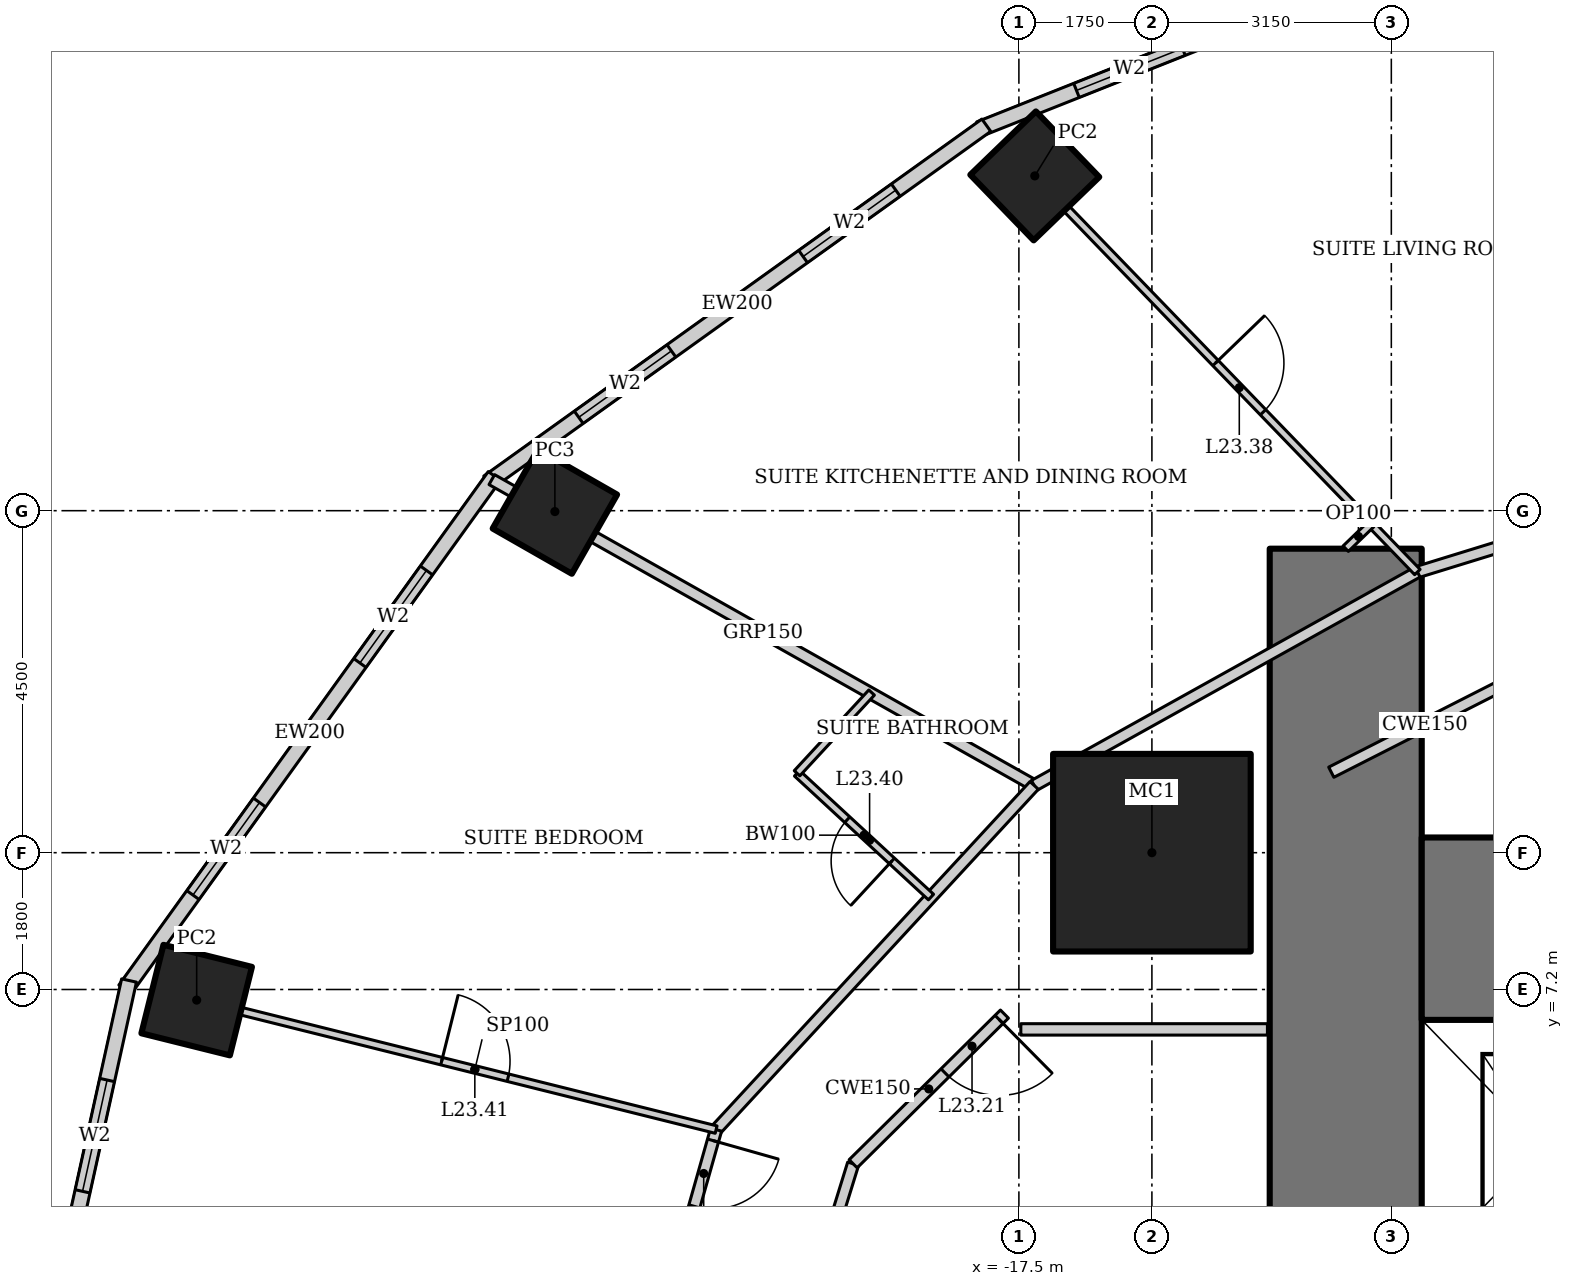
"""IFC4 building model, lengths in metres.
Left out: names, types, materials, properties, quantities, classifications, styles, units other than length and angle.
Written with IfcOpenShell. Run it as: python <this file> out.ifc"""

import sys

from ifc_helpers import new_model, si_unit, direction, frame, frame_2d, origin, origin_2d, place, context, subcontext, project, spatial, rectangle, hollow_rectangle, extrude, element, fill, save


model = new_model("IFC4")
c1 = context("Model", 3, precision=1e-05, world=origin(), true_north=direction((0.0, 1.0)))
c2 = subcontext(c1, "Body", "Model", "MODEL_VIEW")
j1 = project(units=[si_unit("LENGTHUNIT", "METRE"), si_unit("PLANEANGLEUNIT", "RADIAN")], contexts=[c1])
p1 = place(None, origin())
s1 = spatial("IfcSite", under=j1, at=p1, CompositionType="ELEMENT")
p2 = place(p1, origin())
s2 = spatial("IfcBuilding", under=s1, at=p2, CompositionType="ELEMENT")
p3 = place(p2, frame((0.0, 0.0, 98.2)))
s3 = spatial("IfcBuildingStorey", under=s2, at=p3, CompositionType="ELEMENT", Elevation=98.2)
p4 = place(p3, frame((-15.75, 9.0, 0.0), z_axis=(0.0, 0.0, 1.0), x_axis=(1.0, 0.0, 0.0)))
e1 = element("IfcColumn", 1, at=p4, inside=s3, PredefinedType="COLUMN", context=c2, shape_type="SweptSolid", body=[
    extrude(hollow_rectangle(XDim=2.6, YDim=2.6, WallThickness=0.13, at=origin_2d()), origin(), (0.0, 0.0, 1.0), 3.6),
])
p5 = place(p3, frame((-17.291, 17.905, 0.0), z_axis=(0.0, 0.0, 1.0), x_axis=(0.719339800339, 0.694658370459, 0.0)))
e2 = element("IfcColumn", 2, at=p5, inside=s3, PredefinedType="COLUMN", context=c2, shape_type="SweptSolid", body=[
    extrude(hollow_rectangle(XDim=1.2, YDim=1.2, WallThickness=0.1, at=origin_2d()), origin(), (0.0, 0.0, 1.0), 3.6),
])
p6 = place(p3, frame((-23.605, 13.489, 0.0), z_axis=(0.0, 0.0, 1.0), x_axis=(0.496139221777, 0.86824298017, 0.0)))
e3 = element("IfcColumn", 3, at=p6, inside=s3, PredefinedType="COLUMN", context=c2, shape_type="SweptSolid", body=[
    extrude(hollow_rectangle(XDim=1.2, YDim=1.2, WallThickness=0.12, at=origin_2d()), origin(), (0.0, 0.0, 1.0), 3.6),
])
p7 = place(p3, frame((-28.318, 7.06, 0.0), z_axis=(0.0, 0.0, 1.0), x_axis=(0.2419218956, 0.970295726276, 0.0)))
e4 = element("IfcColumn", 4, at=p7, inside=s3, PredefinedType="COLUMN", context=c2, shape_type="SweptSolid", body=[
    extrude(hollow_rectangle(XDim=1.2, YDim=1.2, WallThickness=0.1, at=origin_2d()), origin(), (0.0, 0.0, 1.0), 3.6),
])
p8 = place(p3, frame((-13.2, 13.0, 0.0), z_axis=(0.0, 0.0, 1.0), x_axis=(0.0, -1.0, 0.0)))
e5 = element("IfcWall", 5, at=p8, inside=s3, PredefinedType="SHEAR", context=c2, shape_type="SweptSolid", body=[
    extrude(rectangle(XDim=26.0, YDim=2.0, at=frame_2d((13.0, 0.0))), origin(), (0.0, 0.0, 1.0), 3.6),
])
p9 = place(p8, frame((12.1, 0.0, 0.0)))
e6 = element("IfcOpeningElement", 6, at=p9, cuts=e5, PredefinedType="OPENING", context=c2, shape_type="SweptSolid", body=[
    extrude(rectangle(XDim=1.8, YDim=2.1, at=frame_2d((0.9, 1.05))), frame((0.0, 1.01, 0.0), z_axis=(0.0, -1.0, 0.0), x_axis=(1.0, 0.0, 0.0)), (0.0, 0.0, 1.0), 2.02),
])
p10 = place(p3, frame((12.2, 8.0, 0.0), z_axis=(0.0, 0.0, 1.0), x_axis=(-1.0, 0.0, 0.0)))
e7 = element("IfcWall", 7, at=p10, inside=s3, PredefinedType="SHEAR", context=c2, shape_type="SweptSolid", body=[
    extrude(rectangle(XDim=24.4, YDim=2.4, at=frame_2d((12.2, 0.0))), origin(), (0.0, 0.0, 1.0), 3.6),
])
p11 = place(p3, frame((-10.869, 21.363, 0.0), z_axis=(0.0, 0.0, 1.0), x_axis=(-0.929358351251, -0.369178892895, 0.0)))
e8 = element("IfcWall", 8, at=p11, inside=s3, PredefinedType="SOLIDWALL", context=c2, shape_type="SweptSolid", body=[
    extrude(rectangle(XDim=7.692, YDim=0.2, at=frame_2d((3.846, 0.0))), origin(), (0.0, 0.0, 1.0), 3.45),
])
p12 = place(p11, frame((1.373, 0.0, 0.5)))
e9 = element("IfcOpeningElement", 9, at=p12, cuts=e8, PredefinedType="OPENING", context=c2, shape_type="SweptSolid", body=[
    extrude(rectangle(XDim=1.5, YDim=2.2, at=frame_2d((0.75, 1.1))), frame((0.0, 0.11, 0.0), z_axis=(0.0, -1.0, 0.0), x_axis=(1.0, 0.0, 0.0)), (0.0, 0.0, 1.0), 0.22),
])
p13 = place(p11, frame((4.819, 0.0, 0.5)))
e10 = element("IfcOpeningElement", 10, at=p13, cuts=e8, PredefinedType="OPENING", context=c2, shape_type="SweptSolid", body=[
    extrude(rectangle(XDim=1.5, YDim=2.2, at=frame_2d((0.75, 1.1))), frame((0.0, 0.11, 0.0), z_axis=(0.0, -1.0, 0.0), x_axis=(1.0, 0.0, 0.0)), (0.0, 0.0, 1.0), 0.22),
])
p14 = place(p3, frame((-17.929, 18.572, 0.0), z_axis=(0.0, 0.0, 1.0), x_axis=(-0.812791321576, -0.582554948112, 0.0)))
e11 = element("IfcWall", 11, at=p14, inside=s3, PredefinedType="SOLIDWALL", context=c2, shape_type="SweptSolid", body=[
    extrude(rectangle(XDim=8.063, YDim=0.2, at=frame_2d((4.032, 0.0))), origin(), (0.0, 0.0, 1.0), 3.45),
])
p15 = place(p14, frame((1.466, 0.0, 0.5)))
e12 = element("IfcOpeningElement", 12, at=p15, cuts=e11, PredefinedType="OPENING", context=c2, shape_type="SweptSolid", body=[
    extrude(rectangle(XDim=1.5, YDim=2.2, at=frame_2d((0.75, 1.1))), frame((0.0, 0.11, 0.0), z_axis=(0.0, -1.0, 0.0), x_axis=(1.0, 0.0, 0.0)), (0.0, 0.0, 1.0), 0.22),
])
p16 = place(p14, frame((5.097, 0.0, 0.5)))
e13 = element("IfcOpeningElement", 13, at=p16, cuts=e11, PredefinedType="OPENING", context=c2, shape_type="SweptSolid", body=[
    extrude(rectangle(XDim=1.5, YDim=2.2, at=frame_2d((0.75, 1.1))), frame((0.0, 0.11, 0.0), z_axis=(0.0, -1.0, 0.0), x_axis=(1.0, 0.0, 0.0)), (0.0, 0.0, 1.0), 0.22),
])
p17 = place(p3, frame((-24.4, 13.957, 0.0), z_axis=(0.0, 0.0, 1.0), x_axis=(-0.583937613703, -0.811798536155, 0.0)))
e14 = element("IfcWall", 14, at=p17, inside=s3, PredefinedType="SOLIDWALL", context=c2, shape_type="SweptSolid", body=[
    extrude(rectangle(XDim=8.323, YDim=0.2, at=frame_2d((4.162, 0.0))), origin(), (0.0, 0.0, 1.0), 3.45),
])
p18 = place(p17, frame((1.531, 0.0, 0.5)))
e15 = element("IfcOpeningElement", 15, at=p18, cuts=e14, PredefinedType="OPENING", context=c2, shape_type="SweptSolid", body=[
    extrude(rectangle(XDim=1.5, YDim=2.2, at=frame_2d((0.75, 1.1))), frame((0.0, 0.11, 0.0), z_axis=(0.0, -1.0, 0.0), x_axis=(1.0, 0.0, 0.0)), (0.0, 0.0, 1.0), 0.22),
])
p19 = place(p17, frame((5.292, 0.0, 0.5)))
e16 = element("IfcOpeningElement", 16, at=p19, cuts=e14, PredefinedType="OPENING", context=c2, shape_type="SweptSolid", body=[
    extrude(rectangle(XDim=1.5, YDim=2.2, at=frame_2d((0.75, 1.1))), frame((0.0, 0.11, 0.0), z_axis=(0.0, -1.0, 0.0), x_axis=(1.0, 0.0, 0.0)), (0.0, 0.0, 1.0), 0.22),
])
p20 = place(p3, frame((-29.208, 7.318, 0.0), z_axis=(0.0, 0.0, 1.0), x_axis=(-0.215238065514, -0.976561608478, 0.0)))
e17 = element("IfcWall", 17, at=p20, inside=s3, PredefinedType="SOLIDWALL", context=c2, shape_type="SweptSolid", body=[
    extrude(rectangle(XDim=7.562, YDim=0.2, at=frame_2d((3.781, 0.0))), origin(), (0.0, 0.0, 1.0), 3.45),
])
p21 = place(p20, frame((1.341, 0.0, 0.5)))
e18 = element("IfcOpeningElement", 18, at=p21, cuts=e17, PredefinedType="OPENING", context=c2, shape_type="SweptSolid", body=[
    extrude(rectangle(XDim=1.5, YDim=2.2, at=frame_2d((0.75, 1.1))), frame((0.0, 0.11, 0.0), z_axis=(0.0, -1.0, 0.0), x_axis=(1.0, 0.0, 0.0)), (0.0, 0.0, 1.0), 0.22),
])
p22 = place(p20, frame((4.722, 0.0, 0.5)))
e19 = element("IfcOpeningElement", 19, at=p22, cuts=e17, PredefinedType="OPENING", context=c2, shape_type="SweptSolid", body=[
    extrude(rectangle(XDim=1.5, YDim=2.2, at=frame_2d((0.75, 1.1))), frame((0.0, 0.11, 0.0), z_axis=(0.0, -1.0, 0.0), x_axis=(1.0, 0.0, 0.0)), (0.0, 0.0, 1.0), 0.22),
])
p23 = place(p3, frame((-24.435, 13.909, 0.0), z_axis=(0.0, 0.0, 1.0), x_axis=(0.871075246657, -0.491149584813, 0.0)))
e20 = element("IfcWall", 20, at=p23, inside=s3, PredefinedType="PARTITIONING", context=c2, shape_type="SweptSolid", body=[
    extrude(rectangle(XDim=8.192, YDim=0.15, at=frame_2d((4.096, 0.0))), origin(), (0.0, 0.0, 1.0), 2.693),
])
p24 = place(p3, frame((-7.253, 14.235, 0.0), z_axis=(0.0, 0.0, 1.0), x_axis=(-0.955657956744, -0.294478980085, 0.0)))
e21 = element("IfcWall", 21, at=p24, inside=s3, PredefinedType="PARTITIONING", context=c2, shape_type="SweptSolid", body=[
    extrude(rectangle(XDim=5.236, YDim=0.15, at=frame_2d((2.618, 0.0))), origin(), (0.0, 0.0, 1.0), 3.45),
])
p25 = place(p24, frame((0.15, 0.0, 0.0)))
e22 = element("IfcOpeningElement", 22, at=p25, cuts=e21, PredefinedType="OPENING", context=c2, shape_type="SweptSolid", body=[
    extrude(rectangle(XDim=0.9, YDim=2.1, at=frame_2d((0.45, 1.05))), frame((0.0, 0.085, 0.0), z_axis=(0.0, -1.0, 0.0), x_axis=(1.0, 0.0, 0.0)), (0.0, 0.0, 1.0), 0.17),
])
p26 = place(p3, frame((-12.257, 12.693, 0.0), z_axis=(0.0, 0.0, 1.0), x_axis=(-0.873695910579, -0.486472461541, 0.0)))
e23 = element("IfcWall", 23, at=p26, inside=s3, PredefinedType="PARTITIONING", context=c2, shape_type="SweptSolid", body=[
    extrude(rectangle(XDim=5.771, YDim=0.15, at=frame_2d((2.885, 0.0))), origin(), (0.0, 0.0, 1.0), 3.45),
])
p27 = place(p3, frame((-17.299, 9.885, 0.0), z_axis=(0.0, 0.0, 1.0), x_axis=(-0.678641806296, -0.734469399463, 0.0)))
e24 = element("IfcWall", 24, at=p27, inside=s3, PredefinedType="PARTITIONING", context=c2, shape_type="SweptSolid", body=[
    extrude(rectangle(XDim=6.166, YDim=0.15, at=frame_2d((3.083, 0.0))), origin(), (0.0, 0.0, 1.0), 3.45),
])
p28 = place(p3, frame((-21.484, 5.356, 0.0), z_axis=(0.0, 0.0, 1.0), x_axis=(-0.272386051236, -0.962188047677, 0.0)))
e25 = element("IfcWall", 25, at=p28, inside=s3, PredefinedType="PARTITIONING", context=c2, shape_type="SweptSolid", body=[
    extrude(rectangle(XDim=5.567, YDim=0.15, at=frame_2d((2.783, 0.0))), origin(), (0.0, 0.0, 1.0), 3.45),
])
p29 = place(p28, frame((0.15, 0.0, 0.0)))
e26 = element("IfcOpeningElement", 26, at=p29, cuts=e25, PredefinedType="OPENING", context=c2, shape_type="SweptSolid", body=[
    extrude(rectangle(XDim=0.9, YDim=2.1, at=frame_2d((0.45, 1.05))), frame((0.0, 0.085, 0.0), z_axis=(0.0, -1.0, 0.0), x_axis=(1.0, 0.0, 0.0)), (0.0, 0.0, 1.0), 0.17),
])
p30 = place(p3, frame((-19.681, 4.907, 0.0), z_axis=(0.0, 0.0, 1.0), x_axis=(-0.295778570807, -0.955256529447, 0.0)))
e27 = element("IfcWall", 27, at=p30, inside=s3, PredefinedType="PARTITIONING", context=c2, shape_type="SweptSolid", body=[
    extrude(rectangle(XDim=4.195, YDim=0.15, at=frame_2d((2.097, 0.0))), origin(), (0.0, 0.0, 1.0), 3.45),
])
p31 = place(p3, frame((-16.944, 17.545, 0.0), z_axis=(0.0, 0.0, 1.0), x_axis=(0.694677175107, -0.719321640426, 0.0)))
e28 = element("IfcWall", 28, at=p31, inside=s3, PredefinedType="PARTITIONING", context=c2, shape_type="SweptSolid", body=[
    extrude(rectangle(XDim=6.746, YDim=0.1, at=frame_2d((3.373, 0.0))), origin(), (0.0, 0.0, 1.0), 2.528),
])
p32 = place(p31, frame((2.923, 0.0, 0.0)))
e29 = element("IfcOpeningElement", 29, at=p32, cuts=e28, PredefinedType="OPENING", context=c2, shape_type="SweptSolid", body=[
    extrude(rectangle(XDim=0.9, YDim=2.1, at=frame_2d((0.45, 1.05))), frame((0.0, 0.06, 0.0), z_axis=(0.0, -1.0, 0.0), x_axis=(1.0, 0.0, 0.0)), (0.0, 0.0, 1.0), 0.12),
])
p33 = place(p3, frame((-18.656, 8.416, 0.0), z_axis=(0.0, 0.0, 1.0), x_axis=(-0.73447964986, 0.678630712495, 0.0)))
e30 = element("IfcWall", 30, at=p33, inside=s3, PredefinedType="PARTITIONING", context=c2, shape_type="SweptSolid", body=[
    extrude(rectangle(XDim=2.4, YDim=0.1, at=frame_2d((1.2, 0.0))), origin(), (0.0, 0.0, 1.0), 3.45),
])
p34 = place(p33, frame((0.7, 0.0, 0.0)))
e31 = element("IfcOpeningElement", 31, at=p34, cuts=e30, PredefinedType="OPENING", context=c2, shape_type="SweptSolid", body=[
    extrude(rectangle(XDim=0.8, YDim=2.1, at=frame_2d((0.4, 1.05))), frame((0.0, 0.06, 0.0), z_axis=(0.0, -1.0, 0.0), x_axis=(1.0, 0.0, 0.0)), (0.0, 0.0, 1.0), 0.12),
])
p35 = place(p3, frame((-20.419, 10.045, 0.0), z_axis=(0.0, 0.0, 1.0), x_axis=(0.67861657312, 0.734492713842, 0.0)))
e32 = element("IfcWall", 32, at=p35, inside=s3, PredefinedType="PARTITIONING", context=c2, shape_type="SweptSolid", body=[
    extrude(rectangle(XDim=1.446, YDim=0.1, at=frame_2d((0.723, 0.0))), origin(), (0.0, 0.0, 1.0), 3.45),
])
p36 = place(p3, frame((-27.833, 6.939, 0.0), z_axis=(0.0, 0.0, 1.0), x_axis=(0.970295936837, -0.241921051083, 0.0)))
e33 = element("IfcWall", 33, at=p36, inside=s3, PredefinedType="PARTITIONING", context=c2, shape_type="SweptSolid", body=[
    extrude(rectangle(XDim=6.543, YDim=0.1, at=frame_2d((3.272, 0.0))), origin(), (0.0, 0.0, 1.0), 2.333),
])
p37 = place(p36, frame((2.822, 0.0, 0.0)))
e34 = element("IfcOpeningElement", 34, at=p37, cuts=e33, PredefinedType="OPENING", context=c2, shape_type="SweptSolid", body=[
    extrude(rectangle(XDim=0.9, YDim=2.1, at=frame_2d((0.45, 1.05))), frame((0.0, 0.06, 0.0), z_axis=(0.0, -1.0, 0.0), x_axis=(1.0, 0.0, 0.0)), (0.0, 0.0, 1.0), 0.12),
])
p38 = place(p3, frame((-13.2, 13.0, 0.0), z_axis=(0.0, 0.0, 1.0), x_axis=(0.719347134512, 0.69465077562, 0.0)))
e35 = element("IfcWall", 35, at=p38, inside=s3, PredefinedType="PARTITIONING", context=c2, shape_type="SweptSolid", body=[
    extrude(rectangle(XDim=0.465, YDim=0.1, at=frame_2d((0.232, 0.0))), origin(), (0.0, 0.0, 1.0), 3.45),
])
p39 = place(p3, frame((-10.924, 11.312, 0.0), z_axis=(0.0, 0.0, 1.0), x_axis=(-0.891388152271, -0.453240732935, 0.0)))
e36 = element("IfcWall", 36, at=p39, inside=s3, PredefinedType="PARTITIONING", context=c2, shape_type="SweptSolid", body=[
    extrude(rectangle(XDim=2.766, YDim=0.15, at=frame_2d((1.383, 0.0))), origin(), (0.0, 0.0, 1.0), 3.45),
])
p40 = place(p3, frame((-17.69, 6.876, 0.0), z_axis=(0.0, 0.0, 1.0), x_axis=(-0.710845937688, -0.70334774676, 0.0)))
e37 = element("IfcWall", 37, at=p40, inside=s3, PredefinedType="PARTITIONING", context=c2, shape_type="SweptSolid", body=[
    extrude(rectangle(XDim=2.8, YDim=0.15, at=frame_2d((1.4, 0.0))), origin(), (0.0, 0.0, 1.0), 3.45),
])
p41 = place(p40, frame((0.1, 0.0, 0.0)))
e38 = element("IfcOpeningElement", 38, at=p41, cuts=e37, PredefinedType="OPENING", context=c2, shape_type="SweptSolid", body=[
    extrude(rectangle(XDim=1.0, YDim=2.1, at=frame_2d((0.5, 1.05))), frame((0.0, 0.085, 0.0), z_axis=(0.0, -1.0, 0.0), x_axis=(1.0, 0.0, 0.0)), (0.0, 0.0, 1.0), 0.17),
])
p42 = place(p3, frame((-14.23, 6.675, 0.0), z_axis=(0.0, 0.0, 1.0), x_axis=(-1.0, 0.0, 0.0)))
e39 = element("IfcWall", 39, at=p42, inside=s3, PredefinedType="PARTITIONING", context=c2, shape_type="SweptSolid", body=[
    extrude(rectangle(XDim=3.245, YDim=0.15, at=frame_2d((1.622, 0.0))), origin(), (0.0, 0.0, 1.0), 3.45),
])
p43 = place(p13, origin())
e40 = element("IfcWindow", 40, at=p43, inside=s3, PartitioningType="SINGLE_PANEL", PredefinedType="WINDOW", context=c2, shape_type="SweptSolid", body=[
    extrude(rectangle(XDim=1.5, YDim=2.2, at=frame_2d((0.75, 1.1))), frame((0.0, 0.03, 0.0), z_axis=(0.0, -1.0, 0.0), x_axis=(1.0, 0.0, 0.0)), (0.0, 0.0, 1.0), 0.06),
])
fill(e10, e40)
p44 = place(p15, origin())
e41 = element("IfcWindow", 41, at=p44, inside=s3, PartitioningType="SINGLE_PANEL", PredefinedType="WINDOW", context=c2, shape_type="SweptSolid", body=[
    extrude(rectangle(XDim=1.5, YDim=2.2, at=frame_2d((0.75, 1.1))), frame((0.0, 0.03, 0.0), z_axis=(0.0, -1.0, 0.0), x_axis=(1.0, 0.0, 0.0)), (0.0, 0.0, 1.0), 0.06),
])
fill(e12, e41)
p45 = place(p16, origin())
e42 = element("IfcWindow", 42, at=p45, inside=s3, PartitioningType="SINGLE_PANEL", PredefinedType="WINDOW", context=c2, shape_type="SweptSolid", body=[
    extrude(rectangle(XDim=1.5, YDim=2.2, at=frame_2d((0.75, 1.1))), frame((0.0, 0.03, 0.0), z_axis=(0.0, -1.0, 0.0), x_axis=(1.0, 0.0, 0.0)), (0.0, 0.0, 1.0), 0.06),
])
fill(e13, e42)
p46 = place(p18, origin())
e43 = element("IfcWindow", 43, at=p46, inside=s3, PartitioningType="SINGLE_PANEL", PredefinedType="WINDOW", context=c2, shape_type="SweptSolid", body=[
    extrude(rectangle(XDim=1.5, YDim=2.2, at=frame_2d((0.75, 1.1))), frame((0.0, 0.03, 0.0), z_axis=(0.0, -1.0, 0.0), x_axis=(1.0, 0.0, 0.0)), (0.0, 0.0, 1.0), 0.06),
])
fill(e15, e43)
p47 = place(p19, origin())
e44 = element("IfcWindow", 44, at=p47, inside=s3, PartitioningType="SINGLE_PANEL", PredefinedType="WINDOW", context=c2, shape_type="SweptSolid", body=[
    extrude(rectangle(XDim=1.5, YDim=2.2, at=frame_2d((0.75, 1.1))), frame((0.0, 0.03, 0.0), z_axis=(0.0, -1.0, 0.0), x_axis=(1.0, 0.0, 0.0)), (0.0, 0.0, 1.0), 0.06),
])
fill(e16, e44)
p48 = place(p21, origin())
e45 = element("IfcWindow", 45, at=p48, inside=s3, PartitioningType="SINGLE_PANEL", PredefinedType="WINDOW", context=c2, shape_type="SweptSolid", body=[
    extrude(rectangle(XDim=1.5, YDim=2.2, at=frame_2d((0.75, 1.1))), frame((0.0, 0.03, 0.0), z_axis=(0.0, -1.0, 0.0), x_axis=(1.0, 0.0, 0.0)), (0.0, 0.0, 1.0), 0.06),
])
fill(e18, e45)
p49 = place(p41, origin())
e46 = element("IfcDoor", 46, at=p49, inside=s3, OperationType="SINGLE_SWING_LEFT", PredefinedType="DOOR", context=c2, shape_type="SweptSolid", body=[
    extrude(rectangle(XDim=1.0, YDim=2.1, at=frame_2d((0.5, 1.05))), frame((0.0, 0.025, 0.0), z_axis=(0.0, -1.0, 0.0), x_axis=(1.0, 0.0, 0.0)), (0.0, 0.0, 1.0), 0.05),
])
fill(e38, e46)
p50 = place(p32, origin())
e47 = element("IfcDoor", 47, at=p50, inside=s3, OperationType="SINGLE_SWING_LEFT", PredefinedType="DOOR", context=c2, shape_type="SweptSolid", body=[
    extrude(rectangle(XDim=0.9, YDim=2.1, at=frame_2d((0.45, 1.05))), frame((0.0, 0.025, 0.0), z_axis=(0.0, -1.0, 0.0), x_axis=(1.0, 0.0, 0.0)), (0.0, 0.0, 1.0), 0.05),
])
fill(e29, e47)
p51 = place(p34, origin())
e48 = element("IfcDoor", 48, at=p51, inside=s3, OperationType="SINGLE_SWING_LEFT", PredefinedType="DOOR", context=c2, shape_type="SweptSolid", body=[
    extrude(rectangle(XDim=0.8, YDim=2.1, at=frame_2d((0.4, 1.05))), frame((0.0, 0.025, 0.0), z_axis=(0.0, -1.0, 0.0), x_axis=(1.0, 0.0, 0.0)), (0.0, 0.0, 1.0), 0.05),
])
fill(e31, e48)
p52 = place(p37, origin())
e49 = element("IfcDoor", 49, at=p52, inside=s3, OperationType="SINGLE_SWING_LEFT", PredefinedType="DOOR", context=c2, shape_type="SweptSolid", body=[
    extrude(rectangle(XDim=0.9, YDim=2.1, at=frame_2d((0.45, 1.05))), frame((0.0, 0.025, 0.0), z_axis=(0.0, -1.0, 0.0), x_axis=(1.0, 0.0, 0.0)), (0.0, 0.0, 1.0), 0.05),
])
fill(e34, e49)
p53 = place(p29, origin())
e50 = element("IfcDoor", 50, at=p53, inside=s3, OperationType="SINGLE_SWING_LEFT", PredefinedType="DOOR", context=c2, shape_type="SweptSolid", body=[
    extrude(rectangle(XDim=0.9, YDim=2.1, at=frame_2d((0.45, 1.05))), frame((0.0, 0.025, 0.0), z_axis=(0.0, -1.0, 0.0), x_axis=(1.0, 0.0, 0.0)), (0.0, 0.0, 1.0), 0.05),
])
fill(e26, e50)
save(model, sys.argv[1])
